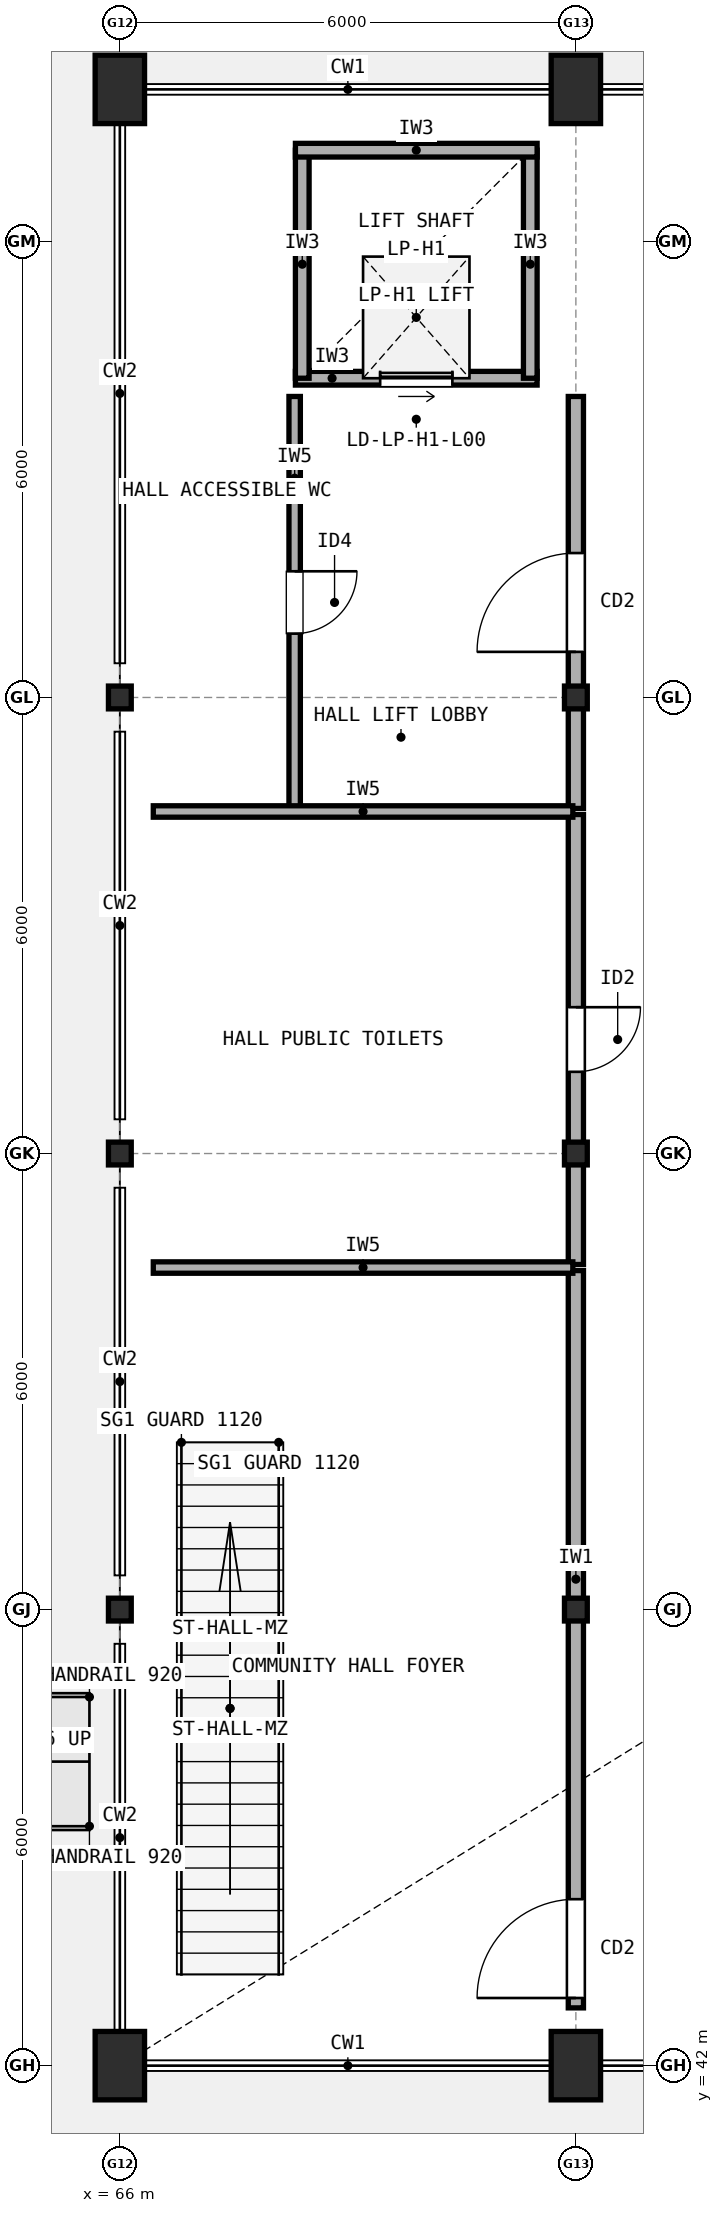
"""IFC4 building model, lengths in metres.
Left out: names, types, materials, properties, quantities, classifications, styles, units other than length and angle.
Written with IfcOpenShell. Run it as: python <this file> out.ifc"""

import sys

from ifc_helpers import new_model, si_unit, direction, frame, frame_2d, origin, origin_2d, place, context, subcontext, project, spatial, rectangle, i_section, extrude, element, fill, save


model = new_model("IFC4")
c1 = context("Model", 3, precision=1e-05, world=origin(), true_north=direction((0.0, 1.0)))
c2 = subcontext(c1, "Body", "Model", "MODEL_VIEW")
j1 = project(units=[si_unit("LENGTHUNIT", "METRE"), si_unit("PLANEANGLEUNIT", "RADIAN")], contexts=[c1])
p1 = place(None, origin())
s1 = spatial("IfcSite", under=j1, at=p1, CompositionType="ELEMENT")
p2 = place(p1, origin())
s2 = spatial("IfcBuilding", under=s1, at=p2, CompositionType="ELEMENT")
p3 = place(p2, origin())
s3 = spatial("IfcBuildingStorey", under=s2, at=p3, CompositionType="ELEMENT", Elevation=0.0)
p4 = place(p3, frame((66.0, 42.0, 0.0), z_axis=(0.0, 0.0, 1.0), x_axis=(1.0, 0.0, 0.0)))
e1 = element("IfcColumn", 1, at=p4, inside=s3, PredefinedType="COLUMN", context=c2, shape_type="SweptSolid", body=[
    extrude(rectangle(XDim=0.65, YDim=0.9, at=origin_2d()), origin(), (0.0, 0.0, 1.0), 4.23),
])
for number, where, z_axis, x_axis in (
    (2, (66.0, 48.0, 0.0), (0.0, 0.0, 1.0), (1.0, 0.0, 0.0)),
    (3, (66.0, 54.0, 0.0), (0.0, 0.0, 1.0), (1.0, 0.0, 0.0)),
    (4, (66.0, 60.0, 0.0), (0.0, 0.0, 1.0), (1.0, 0.0, 0.0)),
):
    element("IfcColumn", number, at=place(p3, frame(where, z_axis=z_axis, x_axis=x_axis)), inside=s3, PredefinedType="COLUMN", context=c2, shape_type="SweptSolid", body=[
        extrude(i_section(OverallWidth=0.3, OverallDepth=0.3, WebThickness=0.011, FlangeThickness=0.019, FilletRadius=0.027, at=origin_2d()), origin(), (0.0, 0.0, 1.0), 4.23),
    ])
for number, where, z_axis, x_axis in (
    (5, (66.0, 68.0, 0.0), (0.0, 0.0, 1.0), (1.0, 0.0, 0.0)),
    (6, (72.0, 42.0, 0.0), (0.0, 0.0, 1.0), (1.0, 0.0, 0.0)),
):
    element("IfcColumn", number, at=place(p3, frame(where, z_axis=z_axis, x_axis=x_axis)), inside=s3, PredefinedType="COLUMN", context=c2, shape_type="SweptSolid", body=[
        extrude(rectangle(XDim=0.65, YDim=0.9, at=origin_2d()), origin(), (0.0, 0.0, 1.0), 4.23),
    ])
for number, where, z_axis, x_axis in (
    (7, (72.0, 48.0, 0.0), (0.0, 0.0, 1.0), (1.0, 0.0, 0.0)),
    (8, (72.0, 54.0, 0.0), (0.0, 0.0, 1.0), (1.0, 0.0, 0.0)),
    (9, (72.0, 60.0, 0.0), (0.0, 0.0, 1.0), (1.0, 0.0, 0.0)),
):
    element("IfcColumn", number, at=place(p3, frame(where, z_axis=z_axis, x_axis=x_axis)), inside=s3, PredefinedType="COLUMN", context=c2, shape_type="SweptSolid", body=[
        extrude(i_section(OverallWidth=0.3, OverallDepth=0.3, WebThickness=0.011, FlangeThickness=0.019, FilletRadius=0.027, at=origin_2d()), origin(), (0.0, 0.0, 1.0), 4.23),
    ])
p5 = place(p3, frame((72.0, 68.0, 0.0), z_axis=(0.0, 0.0, 1.0), x_axis=(1.0, 0.0, 0.0)))
e10 = element("IfcColumn", 10, at=p5, inside=s3, PredefinedType="COLUMN", context=c2, shape_type="SweptSolid", body=[
    extrude(rectangle(XDim=0.65, YDim=0.9, at=origin_2d()), origin(), (0.0, 0.0, 1.0), 4.23),
])
p6 = place(p3, frame((68.31, 64.2, 0.0), z_axis=(0.0, 0.0, 1.0), x_axis=(1.0, 0.0, 0.0)))
e11 = element("IfcWall", 11, at=p6, inside=s3, PredefinedType="SOLIDWALL", context=c2, shape_type="SweptSolid", body=[
    extrude(rectangle(XDim=3.18, YDim=0.18, at=frame_2d((1.59, 0.0))), origin(), (0.0, 0.0, 1.0), 4.23),
])
p7 = place(p6, frame((1.115, 0.0, 0.0)))
e12 = element("IfcOpeningElement", 12, at=p7, cuts=e11, PredefinedType="OPENING", context=c2, shape_type="SweptSolid", body=[
    extrude(rectangle(XDim=0.95, YDim=2.15, at=frame_2d((0.475, 1.075))), frame((0.0, 0.1, 0.0), z_axis=(0.0, -1.0, 0.0), x_axis=(1.0, 0.0, 0.0)), (0.0, 0.0, 1.0), 0.2),
])
for number, where, z_axis, x_axis in (
    (13, (68.4, 67.2, 0.0), (0.0, 0.0, 1.0), (0.0, -1.0, 0.0)),
    (14, (71.4, 64.2, 0.0), (0.0, 0.0, 1.0), (0.0, 1.0, 0.0)),
):
    element("IfcWall", number, at=place(p3, frame(where, z_axis=z_axis, x_axis=x_axis)), inside=s3, PredefinedType="SOLIDWALL", context=c2, shape_type="SweptSolid", body=[
        extrude(rectangle(XDim=3.0, YDim=0.18, at=frame_2d((1.5, 0.0))), origin(), (0.0, 0.0, 1.0), 4.23),
    ])
p8 = place(p3, frame((71.49, 67.2, 0.0), z_axis=(0.0, 0.0, 1.0), x_axis=(-1.0, 0.0, 0.0)))
e15 = element("IfcWall", 15, at=p8, inside=s3, PredefinedType="SOLIDWALL", context=c2, shape_type="SweptSolid", body=[
    extrude(rectangle(XDim=3.18, YDim=0.18, at=frame_2d((1.59, 0.0))), origin(), (0.0, 0.0, 1.0), 4.23),
])
p9 = place(p3, frame((72.0, 42.76, 0.0), z_axis=(0.0, 0.0, 1.0), x_axis=(0.0, 1.0, 0.0)))
e16 = element("IfcWall", 16, at=p9, inside=s3, PredefinedType="SOLIDWALL", context=c2, shape_type="SweptSolid", body=[
    extrude(rectangle(XDim=9.7, YDim=0.2, at=frame_2d((4.85, 0.0))), origin(), (0.0, 0.0, 1.0), 3.612),
])
p10 = place(p9, frame((0.13, 0.0, 0.0)))
e17 = element("IfcOpeningElement", 17, at=p10, cuts=e16, PredefinedType="OPENING", context=c2, shape_type="SweptSolid", body=[
    extrude(rectangle(XDim=1.3, YDim=2.15, at=frame_2d((0.65, 1.075))), frame((0.0, 0.11, 0.0), z_axis=(0.0, -1.0, 0.0), x_axis=(1.0, 0.0, 0.0)), (0.0, 0.0, 1.0), 0.22),
])
p11 = place(p3, frame((72.0, 52.54, 0.0), z_axis=(0.0, 0.0, 1.0), x_axis=(0.0, 1.0, 0.0)))
e18 = element("IfcWall", 18, at=p11, inside=s3, PredefinedType="SOLIDWALL", context=c2, shape_type="SweptSolid", body=[
    extrude(rectangle(XDim=5.92, YDim=0.2, at=frame_2d((2.96, 0.0))), origin(), (0.0, 0.0, 1.0), 3.612),
])
p12 = place(p11, frame((2.535, 0.0, 0.0)))
e19 = element("IfcOpeningElement", 19, at=p12, cuts=e18, PredefinedType="OPENING", context=c2, shape_type="SweptSolid", body=[
    extrude(rectangle(XDim=0.85, YDim=2.1, at=frame_2d((0.425, 1.05))), frame((0.0, 0.11, 0.0), z_axis=(0.0, -1.0, 0.0), x_axis=(1.0, 0.0, 0.0)), (0.0, 0.0, 1.0), 0.22),
])
p13 = place(p3, frame((72.0, 58.54, 0.0), z_axis=(0.0, 0.0, 1.0), x_axis=(0.0, 1.0, 0.0)))
e20 = element("IfcWall", 20, at=p13, inside=s3, PredefinedType="SOLIDWALL", context=c2, shape_type="SweptSolid", body=[
    extrude(rectangle(XDim=5.42, YDim=0.2, at=frame_2d((2.71, 0.0))), origin(), (0.0, 0.0, 1.0), 2.912),
])
p14 = place(p13, frame((2.06, 0.0, 0.0)))
e21 = element("IfcOpeningElement", 21, at=p14, cuts=e20, PredefinedType="OPENING", context=c2, shape_type="SweptSolid", body=[
    extrude(rectangle(XDim=1.3, YDim=2.15, at=frame_2d((0.65, 1.075))), frame((0.0, 0.11, 0.0), z_axis=(0.0, -1.0, 0.0), x_axis=(1.0, 0.0, 0.0)), (0.0, 0.0, 1.0), 0.22),
])
p15 = place(p3, frame((68.3, 58.54, 0.0), z_axis=(0.0, 0.0, 1.0), x_axis=(0.0, 1.0, 0.0)))
e22 = element("IfcWall", 22, at=p15, inside=s3, PredefinedType="PARTITIONING", context=c2, shape_type="SweptSolid", body=[
    extrude(rectangle(XDim=5.42, YDim=0.15, at=frame_2d((2.71, 0.0))), origin(), (0.0, 0.0, 1.0), 3.562),
])
p16 = place(p15, frame((2.3, 0.0, 0.0)))
e23 = element("IfcOpeningElement", 23, at=p16, cuts=e22, PredefinedType="OPENING", context=c2, shape_type="SweptSolid", body=[
    extrude(rectangle(XDim=0.82, YDim=2.08, at=frame_2d((0.41, 1.04))), frame((0.0, 0.085, 0.0), z_axis=(0.0, -1.0, 0.0), x_axis=(1.0, 0.0, 0.0)), (0.0, 0.0, 1.0), 0.17),
])
for number, where, z_axis, x_axis in (
    (24, (66.44, 52.5, 0.0), (0.0, 0.0, 1.0), (1.0, 0.0, 0.0)),
    (25, (66.44, 58.5, 0.0), (0.0, 0.0, 1.0), (1.0, 0.0, 0.0)),
):
    element("IfcWall", number, at=place(p3, frame(where, z_axis=z_axis, x_axis=x_axis)), inside=s3, PredefinedType="PARTITIONING", context=c2, shape_type="SweptSolid", body=[
        extrude(rectangle(XDim=5.52, YDim=0.15, at=frame_2d((2.76, 0.0))), origin(), (0.0, 0.0, 1.0), 3.612),
    ])
p17 = place(p7, frame((0.95, 0.0, 0.0), z_axis=(0.0, 0.0, 1.0), x_axis=(-1.0, 0.0, 0.0)))
e26 = element("IfcDoor", 26, at=p17, inside=s3, OperationType="SLIDING_TO_LEFT", PredefinedType="DOOR", context=c2, shape_type="SweptSolid", body=[
    extrude(rectangle(XDim=0.95, YDim=2.15, at=frame_2d((0.475, 1.075))), frame((0.0, 0.025, 0.0), z_axis=(0.0, -1.0, 0.0), x_axis=(1.0, 0.0, 0.0)), (0.0, 0.0, 1.0), 0.05),
])
fill(e12, e26)
p18 = place(p10, origin())
e27 = element("IfcDoor", 27, at=p18, inside=s3, OperationType="SINGLE_SWING_LEFT", PredefinedType="DOOR", context=c2, shape_type="SweptSolid", body=[
    extrude(rectangle(XDim=1.3, YDim=2.15, at=frame_2d((0.65, 1.075))), frame((0.0, 0.025, 0.0), z_axis=(0.0, -1.0, 0.0), x_axis=(1.0, 0.0, 0.0)), (0.0, 0.0, 1.0), 0.05),
])
fill(e17, e27)
p19 = place(p12, origin())
e28 = element("IfcDoor", 28, at=p19, inside=s3, OperationType="SINGLE_SWING_RIGHT", PredefinedType="DOOR", context=c2, shape_type="SweptSolid", body=[
    extrude(rectangle(XDim=0.85, YDim=2.1, at=frame_2d((0.425, 1.05))), frame((0.0, 0.025, 0.0), z_axis=(0.0, -1.0, 0.0), x_axis=(1.0, 0.0, 0.0)), (0.0, 0.0, 1.0), 0.05),
])
fill(e19, e28)
p20 = place(p14, origin())
e29 = element("IfcDoor", 29, at=p20, inside=s3, OperationType="SINGLE_SWING_LEFT", PredefinedType="DOOR", context=c2, shape_type="SweptSolid", body=[
    extrude(rectangle(XDim=1.3, YDim=2.15, at=frame_2d((0.65, 1.075))), frame((0.0, 0.025, 0.0), z_axis=(0.0, -1.0, 0.0), x_axis=(1.0, 0.0, 0.0)), (0.0, 0.0, 1.0), 0.05),
])
fill(e21, e29)
p21 = place(p16, origin())
e30 = element("IfcDoor", 30, at=p21, inside=s3, OperationType="SINGLE_SWING_RIGHT", PredefinedType="DOOR", context=c2, shape_type="SweptSolid", body=[
    extrude(rectangle(XDim=0.82, YDim=2.08, at=frame_2d((0.41, 1.04))), frame((0.0, 0.025, 0.0), z_axis=(0.0, -1.0, 0.0), x_axis=(1.0, 0.0, 0.0)), (0.0, 0.0, 1.0), 0.05),
])
fill(e23, e30)
save(model, sys.argv[1])
